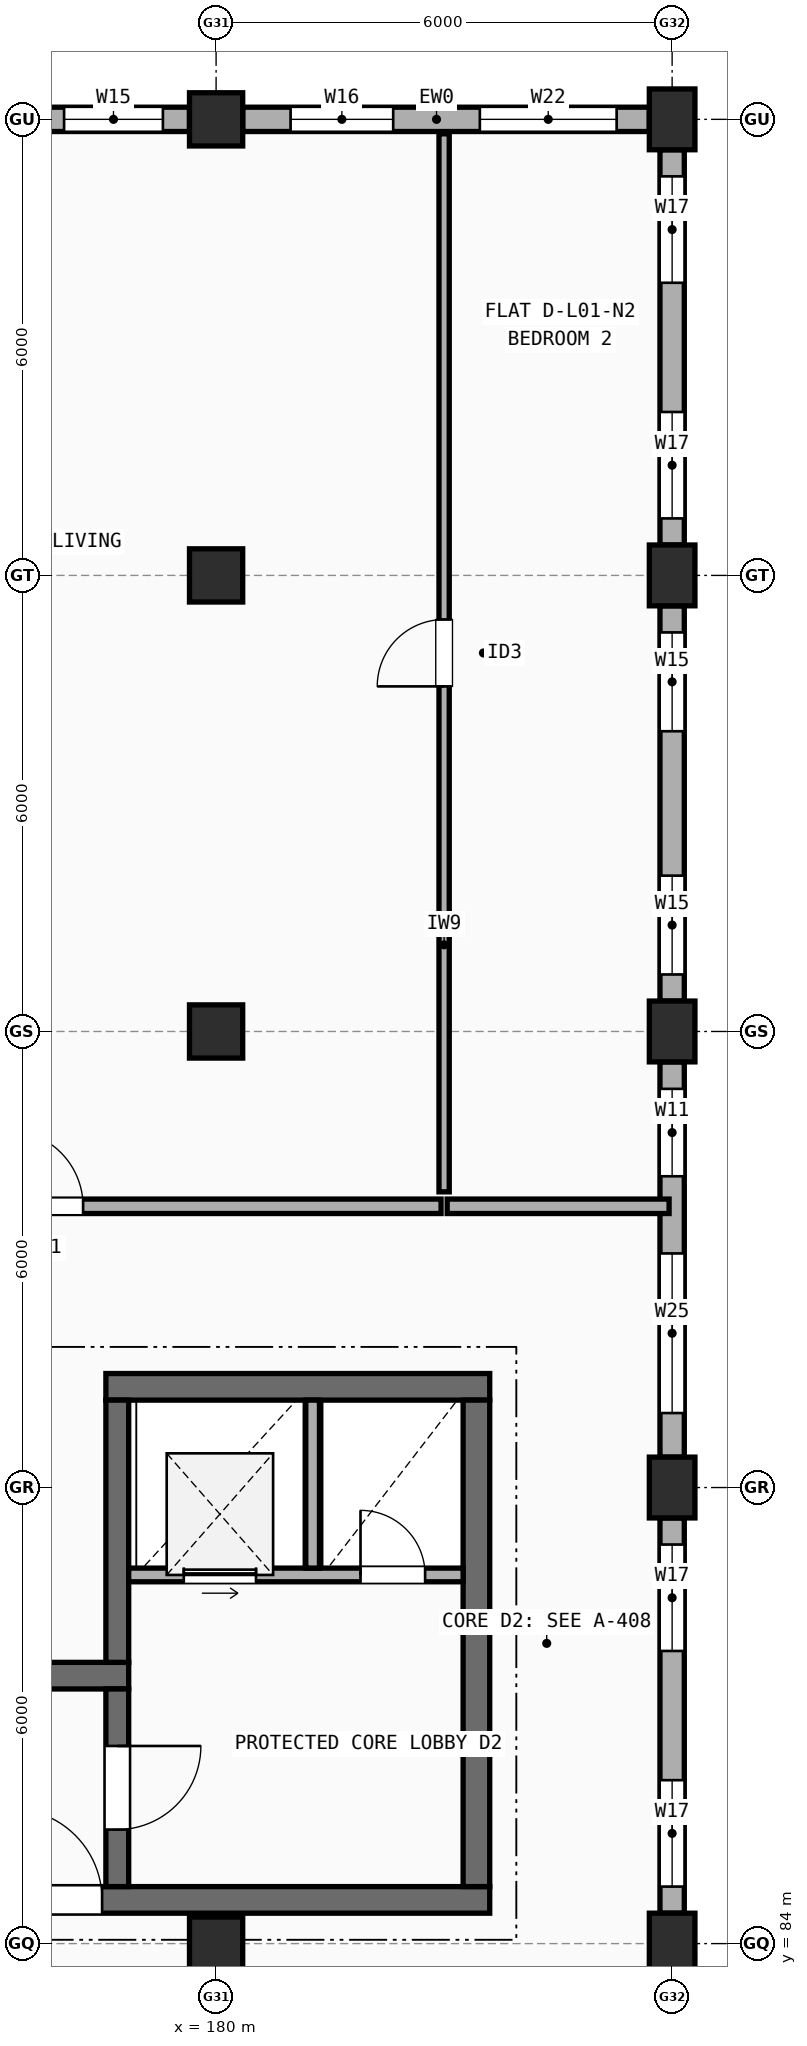
"""IFC4 building model, lengths in metres.
Left out: names, types, materials, properties, quantities, classifications, styles, units other than length and angle.
Written with IfcOpenShell. Run it as: python <this file> out.ifc"""

import sys

from ifc_helpers import new_model, si_unit, direction, frame, frame_2d, origin, origin_2d, place, context, subcontext, project, spatial, rectangle, extrude, element, fill, save


model = new_model("IFC4")
c1 = context("Model", 3, precision=1e-05, world=origin(), true_north=direction((0.0, 1.0)))
c2 = subcontext(c1, "Body", "Model", "MODEL_VIEW")
j1 = project(units=[si_unit("LENGTHUNIT", "METRE"), si_unit("PLANEANGLEUNIT", "RADIAN")], contexts=[c1])
p1 = place(None, origin())
s1 = spatial("IfcSite", under=j1, at=p1, CompositionType="ELEMENT")
p2 = place(p1, origin())
s2 = spatial("IfcBuilding", under=s1, at=p2, CompositionType="ELEMENT")
p3 = place(p2, frame((0.0, 0.0, 4.5)))
s3 = spatial("IfcBuildingStorey", under=s2, at=p3, CompositionType="ELEMENT", Elevation=4.5)
for number, where, z_axis, x_axis in (
    (1, (180.0, 84.0, 0.0), (0.0, 0.0, 1.0), (1.0, 0.0, 0.0)),
    (2, (180.0, 96.0, 0.0), (0.0, 0.0, 1.0), (1.0, 0.0, 0.0)),
    (3, (180.0, 102.0, 0.0), (0.0, 0.0, 1.0), (1.0, 0.0, 0.0)),
    (4, (180.0, 108.0, 0.0), (0.0, 0.0, 1.0), (1.0, 0.0, 0.0)),
):
    element("IfcColumn", number, at=place(p3, frame(where, z_axis=z_axis, x_axis=x_axis)), inside=s3, PredefinedType="COLUMN", context=c2, shape_type="SweptSolid", body=[
        extrude(rectangle(XDim=0.7, YDim=0.7, at=origin_2d()), origin(), (0.0, 0.0, 1.0), 2.945),
    ])
for number, where, z_axis, x_axis in (
    (5, (186.0, 84.0, 0.0), (0.0, 0.0, 1.0), (1.0, 0.0, 0.0)),
    (6, (186.0, 90.0, 0.0), (0.0, 0.0, 1.0), (1.0, 0.0, 0.0)),
    (7, (186.0, 96.0, 0.0), (0.0, 0.0, 1.0), (1.0, 0.0, 0.0)),
    (8, (186.0, 102.0, 0.0), (0.0, 0.0, 1.0), (1.0, 0.0, 0.0)),
    (9, (186.0, 108.0, 0.0), (0.0, 0.0, 1.0), (1.0, 0.0, 0.0)),
):
    element("IfcColumn", number, at=place(p3, frame(where, z_axis=z_axis, x_axis=x_axis)), inside=s3, PredefinedType="COLUMN", context=c2, shape_type="SweptSolid", body=[
        extrude(rectangle(XDim=0.6, YDim=0.8, at=origin_2d()), origin(), (0.0, 0.0, 1.0), 2.945),
    ])
p4 = place(p3, frame((186.0, 84.4, 0.0), z_axis=(0.0, 0.0, 1.0), x_axis=(0.0, 1.0, 0.0)))
e10 = element("IfcWall", 10, at=p4, inside=s3, PredefinedType="STANDARD", context=c2, shape_type="SweptSolid", body=[
    extrude(rectangle(XDim=5.2, YDim=0.32, at=frame_2d((2.6, 0.0))), origin(), (0.0, 0.0, 1.0), 2.945),
])
p5 = place(p4, frame((0.35, 0.0, 0.9)))
e11 = element("IfcOpeningElement", 11, at=p5, cuts=e10, PredefinedType="OPENING", context=c2, shape_type="SweptSolid", body=[
    extrude(rectangle(XDim=1.4, YDim=1.5, at=frame_2d((0.7, 0.75))), frame((0.0, 0.17, 0.0), z_axis=(0.0, -1.0, 0.0), x_axis=(1.0, 0.0, 0.0)), (0.0, 0.0, 1.0), 0.34),
])
p6 = place(p4, frame((3.45, 0.0, 0.9)))
e12 = element("IfcOpeningElement", 12, at=p6, cuts=e10, PredefinedType="OPENING", context=c2, shape_type="SweptSolid", body=[
    extrude(rectangle(XDim=1.4, YDim=1.5, at=frame_2d((0.7, 0.75))), frame((0.0, 0.17, 0.0), z_axis=(0.0, -1.0, 0.0), x_axis=(1.0, 0.0, 0.0)), (0.0, 0.0, 1.0), 0.34),
])
p7 = place(p3, frame((186.0, 90.4, 0.0), z_axis=(0.0, 0.0, 1.0), x_axis=(0.0, 1.0, 0.0)))
e13 = element("IfcWall", 13, at=p7, inside=s3, PredefinedType="STANDARD", context=c2, shape_type="SweptSolid", body=[
    extrude(rectangle(XDim=5.2, YDim=0.32, at=frame_2d((2.6, 0.0))), origin(), (0.0, 0.0, 1.0), 2.945),
])
p8 = place(p7, frame((0.58, 0.0, 0.9)))
e14 = element("IfcOpeningElement", 14, at=p8, cuts=e13, PredefinedType="OPENING", context=c2, shape_type="SweptSolid", body=[
    extrude(rectangle(XDim=2.1, YDim=1.55, at=frame_2d((1.05, 0.775))), frame((0.0, 0.17, 0.0), z_axis=(0.0, -1.0, 0.0), x_axis=(1.0, 0.0, 0.0)), (0.0, 0.0, 1.0), 0.34),
])
p9 = place(p7, frame((3.695, 0.0, 0.9)))
e15 = element("IfcOpeningElement", 15, at=p9, cuts=e13, PredefinedType="OPENING", context=c2, shape_type="SweptSolid", body=[
    extrude(rectangle(XDim=1.15, YDim=1.45, at=frame_2d((0.575, 0.725))), frame((0.0, 0.17, 0.0), z_axis=(0.0, -1.0, 0.0), x_axis=(1.0, 0.0, 0.0)), (0.0, 0.0, 1.0), 0.34),
])
p10 = place(p3, frame((186.0, 96.4, 0.0), z_axis=(0.0, 0.0, 1.0), x_axis=(0.0, 1.0, 0.0)))
e16 = element("IfcWall", 16, at=p10, inside=s3, PredefinedType="STANDARD", context=c2, shape_type="SweptSolid", body=[
    extrude(rectangle(XDim=5.2, YDim=0.32, at=frame_2d((2.6, 0.0))), origin(), (0.0, 0.0, 1.0), 2.945),
])
p11 = place(p10, frame((0.35, 0.0, 0.9)))
e17 = element("IfcOpeningElement", 17, at=p11, cuts=e16, PredefinedType="OPENING", context=c2, shape_type="SweptSolid", body=[
    extrude(rectangle(XDim=1.3, YDim=1.45, at=frame_2d((0.65, 0.725))), frame((0.0, 0.17, 0.0), z_axis=(0.0, -1.0, 0.0), x_axis=(1.0, 0.0, 0.0)), (0.0, 0.0, 1.0), 0.34),
])
p12 = place(p10, frame((3.55, 0.0, 0.9)))
e18 = element("IfcOpeningElement", 18, at=p12, cuts=e16, PredefinedType="OPENING", context=c2, shape_type="SweptSolid", body=[
    extrude(rectangle(XDim=1.3, YDim=1.45, at=frame_2d((0.65, 0.725))), frame((0.0, 0.17, 0.0), z_axis=(0.0, -1.0, 0.0), x_axis=(1.0, 0.0, 0.0)), (0.0, 0.0, 1.0), 0.34),
])
p13 = place(p3, frame((186.0, 102.4, 0.0), z_axis=(0.0, 0.0, 1.0), x_axis=(0.0, 1.0, 0.0)))
e19 = element("IfcWall", 19, at=p13, inside=s3, PredefinedType="STANDARD", context=c2, shape_type="SweptSolid", body=[
    extrude(rectangle(XDim=5.2, YDim=0.32, at=frame_2d((2.6, 0.0))), origin(), (0.0, 0.0, 1.0), 2.945),
])
p14 = place(p13, frame((0.35, 0.0, 0.9)))
e20 = element("IfcOpeningElement", 20, at=p14, cuts=e19, PredefinedType="OPENING", context=c2, shape_type="SweptSolid", body=[
    extrude(rectangle(XDim=1.4, YDim=1.5, at=frame_2d((0.7, 0.75))), frame((0.0, 0.17, 0.0), z_axis=(0.0, -1.0, 0.0), x_axis=(1.0, 0.0, 0.0)), (0.0, 0.0, 1.0), 0.34),
])
p15 = place(p13, frame((3.45, 0.0, 0.9)))
e21 = element("IfcOpeningElement", 21, at=p15, cuts=e19, PredefinedType="OPENING", context=c2, shape_type="SweptSolid", body=[
    extrude(rectangle(XDim=1.4, YDim=1.5, at=frame_2d((0.7, 0.75))), frame((0.0, 0.17, 0.0), z_axis=(0.0, -1.0, 0.0), x_axis=(1.0, 0.0, 0.0)), (0.0, 0.0, 1.0), 0.34),
])
p16 = place(p3, frame((185.7, 108.0, 0.0), z_axis=(0.0, 0.0, 1.0), x_axis=(-1.0, 0.0, 0.0)))
e22 = element("IfcWall", 22, at=p16, inside=s3, PredefinedType="STANDARD", context=c2, shape_type="SweptSolid", body=[
    extrude(rectangle(XDim=5.35, YDim=0.32, at=frame_2d((2.675, 0.0))), origin(), (0.0, 0.0, 1.0), 2.608),
])
p17 = place(p16, frame((0.43, 0.0, 0.9)))
e23 = element("IfcOpeningElement", 23, at=p17, cuts=e22, PredefinedType="OPENING", context=c2, shape_type="SweptSolid", body=[
    extrude(rectangle(XDim=1.8, YDim=1.45, at=frame_2d((0.9, 0.725))), frame((0.0, 0.17, 0.0), z_axis=(0.0, -1.0, 0.0), x_axis=(1.0, 0.0, 0.0)), (0.0, 0.0, 1.0), 0.34),
])
p18 = place(p16, frame((3.37, 0.0, 0.9)))
e24 = element("IfcOpeningElement", 24, at=p18, cuts=e22, PredefinedType="OPENING", context=c2, shape_type="SweptSolid", body=[
    extrude(rectangle(XDim=1.35, YDim=1.5, at=frame_2d((0.675, 0.75))), frame((0.0, 0.17, 0.0), z_axis=(0.0, -1.0, 0.0), x_axis=(1.0, 0.0, 0.0)), (0.0, 0.0, 1.0), 0.34),
])
p19 = place(p3, frame((179.65, 108.0, 0.0), z_axis=(0.0, 0.0, 1.0), x_axis=(-1.0, 0.0, 0.0)))
e25 = element("IfcWall", 25, at=p19, inside=s3, PredefinedType="STANDARD", context=c2, shape_type="SweptSolid", body=[
    extrude(rectangle(XDim=5.3, YDim=0.32, at=frame_2d((2.65, 0.0))), origin(), (0.0, 0.0, 1.0), 2.638),
])
p20 = place(p19, frame((0.35, 0.0, 0.9)))
e26 = element("IfcOpeningElement", 26, at=p20, cuts=e25, PredefinedType="OPENING", context=c2, shape_type="SweptSolid", body=[
    extrude(rectangle(XDim=1.3, YDim=1.45, at=frame_2d((0.65, 0.725))), frame((0.0, 0.17, 0.0), z_axis=(0.0, -1.0, 0.0), x_axis=(1.0, 0.0, 0.0)), (0.0, 0.0, 1.0), 0.34),
])
p21 = place(p19, frame((3.65, 0.0, 0.9)))
e27 = element("IfcOpeningElement", 27, at=p21, cuts=e25, PredefinedType="OPENING", context=c2, shape_type="SweptSolid", body=[
    extrude(rectangle(XDim=1.3, YDim=1.45, at=frame_2d((0.65, 0.725))), frame((0.0, 0.17, 0.0), z_axis=(0.0, -1.0, 0.0), x_axis=(1.0, 0.0, 0.0)), (0.0, 0.0, 1.0), 0.34),
])
p22 = place(p3, frame((172.2, 84.575, 0.0), z_axis=(0.0, 0.0, 1.0), x_axis=(1.0, 0.0, 0.0)))
e28 = element("IfcWall", 28, at=p22, inside=s3, PredefinedType="SHEAR", context=c2, shape_type="SweptSolid", body=[
    extrude(rectangle(XDim=11.4, YDim=0.35, at=frame_2d((5.7, 0.0))), origin(), (0.0, 0.0, 1.0), 2.945),
])
p23 = place(p22, frame((5.1, 0.0, 0.0)))
e29 = element("IfcOpeningElement", 29, at=p23, cuts=e28, PredefinedType="OPENING", context=c2, shape_type="SweptSolid", body=[
    extrude(rectangle(XDim=1.2, YDim=2.15, at=frame_2d((0.6, 1.075))), frame((0.0, 0.185, 0.0), z_axis=(0.0, -1.0, 0.0), x_axis=(1.0, 0.0, 0.0)), (0.0, 0.0, 1.0), 0.37),
])
p24 = place(p3, frame((178.85, 87.525, 0.0), z_axis=(0.0, 0.0, 1.0), x_axis=(-1.0, 0.0, 0.0)))
e30 = element("IfcWall", 30, at=p24, inside=s3, PredefinedType="SHEAR", context=c2, shape_type="SweptSolid", body=[
    extrude(rectangle(XDim=6.65, YDim=0.35, at=frame_2d((3.325, 0.0))), origin(), (0.0, 0.0, 1.0), 2.945),
])
p25 = place(p3, frame((178.7, 84.75, 0.0), z_axis=(0.0, 0.0, 1.0), x_axis=(0.0, 1.0, 0.0)))
e31 = element("IfcWall", 31, at=p25, inside=s3, PredefinedType="SHEAR", context=c2, shape_type="SweptSolid", body=[
    extrude(rectangle(XDim=2.6, YDim=0.3, at=frame_2d((1.3, 0.0))), origin(), (0.0, 0.0, 1.0), 2.945),
])
p26 = place(p25, frame((0.75, 0.0, 0.0)))
e32 = element("IfcOpeningElement", 32, at=p26, cuts=e31, PredefinedType="OPENING", context=c2, shape_type="SweptSolid", body=[
    extrude(rectangle(XDim=1.1, YDim=2.15, at=frame_2d((0.55, 1.075))), frame((0.0, 0.16, 0.0), z_axis=(0.0, -1.0, 0.0), x_axis=(1.0, 0.0, 0.0)), (0.0, 0.0, 1.0), 0.32),
])
p27 = place(p3, frame((183.6, 91.325, 0.0), z_axis=(0.0, 0.0, 1.0), x_axis=(-1.0, 0.0, 0.0)))
e33 = element("IfcWall", 33, at=p27, inside=s3, PredefinedType="SHEAR", context=c2, shape_type="SweptSolid", body=[
    extrude(rectangle(XDim=5.05, YDim=0.35, at=frame_2d((2.525, 0.0))), origin(), (0.0, 0.0, 1.0), 2.945),
])
p28 = place(p3, frame((183.425, 84.75, 0.0), z_axis=(0.0, 0.0, 1.0), x_axis=(0.0, 1.0, 0.0)))
e34 = element("IfcWall", 34, at=p28, inside=s3, PredefinedType="SHEAR", context=c2, shape_type="SweptSolid", body=[
    extrude(rectangle(XDim=6.4, YDim=0.35, at=frame_2d((3.2, 0.0))), origin(), (0.0, 0.0, 1.0), 2.945),
])
p29 = place(p3, frame((178.7, 87.7, 0.0), z_axis=(0.0, 0.0, 1.0), x_axis=(0.0, 1.0, 0.0)))
e35 = element("IfcWall", 35, at=p29, inside=s3, PredefinedType="SHEAR", context=c2, shape_type="SweptSolid", body=[
    extrude(rectangle(XDim=3.45, YDim=0.3, at=frame_2d((1.725, 0.0))), origin(), (0.0, 0.0, 1.0), 2.945),
])
p30 = place(p3, frame((178.85, 88.85, 0.0), z_axis=(0.0, 0.0, 1.0), x_axis=(1.0, 0.0, 0.0)))
e36 = element("IfcWall", 36, at=p30, inside=s3, PredefinedType="SOLIDWALL", context=c2, shape_type="SweptSolid", body=[
    extrude(rectangle(XDim=4.4, YDim=0.18, at=frame_2d((2.2, 0.0))), origin(), (0.0, 0.0, 1.0), 2.945),
])
p31 = place(p30, frame((0.725, 0.0, 0.0)))
e37 = element("IfcOpeningElement", 37, at=p31, cuts=e36, PredefinedType="OPENING", context=c2, shape_type="SweptSolid", body=[
    extrude(rectangle(XDim=0.95, YDim=2.15, at=frame_2d((0.475, 1.075))), frame((0.0, 0.1, 0.0), z_axis=(0.0, -1.0, 0.0), x_axis=(1.0, 0.0, 0.0)), (0.0, 0.0, 1.0), 0.2),
])
p32 = place(p30, frame((3.05, 0.0, 0.0)))
e38 = element("IfcOpeningElement", 38, at=p32, cuts=e36, PredefinedType="OPENING", context=c2, shape_type="SweptSolid", body=[
    extrude(rectangle(XDim=0.85, YDim=2.1, at=frame_2d((0.425, 1.05))), frame((0.0, 0.1, 0.0), z_axis=(0.0, -1.0, 0.0), x_axis=(1.0, 0.0, 0.0)), (0.0, 0.0, 1.0), 0.2),
])
p33 = place(p3, frame((181.27, 88.94, 0.0), z_axis=(0.0, 0.0, 1.0), x_axis=(0.0, 1.0, 0.0)))
e39 = element("IfcWall", 39, at=p33, inside=s3, PredefinedType="SOLIDWALL", context=c2, shape_type="SweptSolid", body=[
    extrude(rectangle(XDim=2.21, YDim=0.18, at=frame_2d((1.105, 0.0))), origin(), (0.0, 0.0, 1.0), 2.945),
])
p34 = place(p3, frame((172.54, 93.7, 0.0), z_axis=(0.0, 0.0, 1.0), x_axis=(1.0, 0.0, 0.0)))
e40 = element("IfcWall", 40, at=p34, inside=s3, PredefinedType="SOLIDWALL", context=c2, shape_type="SweptSolid", body=[
    extrude(rectangle(XDim=10.42, YDim=0.19, at=frame_2d((5.21, 0.0))), origin(), (0.0, 0.0, 1.0), 2.945),
])
p35 = place(p34, frame((4.71, 0.0, 0.0)))
e41 = element("IfcOpeningElement", 41, at=p35, cuts=e40, PredefinedType="OPENING", context=c2, shape_type="SweptSolid", body=[
    extrude(rectangle(XDim=1.0, YDim=2.15, at=frame_2d((0.5, 1.075))), frame((0.0, 0.105, 0.0), z_axis=(0.0, -1.0, 0.0), x_axis=(1.0, 0.0, 0.0)), (0.0, 0.0, 1.0), 0.21),
])
p36 = place(p3, frame((183.04, 93.7, 0.0), z_axis=(0.0, 0.0, 1.0), x_axis=(1.0, 0.0, 0.0)))
e42 = element("IfcWall", 42, at=p36, inside=s3, PredefinedType="SOLIDWALL", context=c2, shape_type="SweptSolid", body=[
    extrude(rectangle(XDim=2.92, YDim=0.19, at=frame_2d((1.46, 0.0))), origin(), (0.0, 0.0, 1.0), 2.945),
])
p37 = place(p3, frame((183.0, 93.89, 0.0), z_axis=(0.0, 0.0, 1.0), x_axis=(0.0, 1.0, 0.0)))
e43 = element("IfcWall", 43, at=p37, inside=s3, PredefinedType="PARTITIONING", context=c2, shape_type="SweptSolid", body=[
    extrude(rectangle(XDim=13.92, YDim=0.135, at=frame_2d((6.96, 0.0))), origin(), (0.0, 0.0, 1.0), 2.548),
])
p38 = place(p37, frame((6.65, 0.0, 0.0)))
e44 = element("IfcOpeningElement", 44, at=p38, cuts=e43, PredefinedType="OPENING", context=c2, shape_type="SweptSolid", body=[
    extrude(rectangle(XDim=0.88, YDim=2.1, at=frame_2d((0.44, 1.05))), frame((0.0, 0.077, 0.0), z_axis=(0.0, -1.0, 0.0), x_axis=(1.0, 0.0, 0.0)), (0.0, 0.0, 1.0), 0.155),
])
p39 = place(p5, origin())
e45 = element("IfcWindow", 45, at=p39, inside=s3, PartitioningType="SINGLE_PANEL", PredefinedType="WINDOW", context=c2, shape_type="SweptSolid", body=[
    extrude(rectangle(XDim=1.4, YDim=1.5, at=frame_2d((0.7, 0.75))), frame((0.0, 0.03, 0.0), z_axis=(0.0, -1.0, 0.0), x_axis=(1.0, 0.0, 0.0)), (0.0, 0.0, 1.0), 0.06),
])
fill(e11, e45)
p40 = place(p6, origin())
e46 = element("IfcWindow", 46, at=p40, inside=s3, PartitioningType="SINGLE_PANEL", PredefinedType="WINDOW", context=c2, shape_type="SweptSolid", body=[
    extrude(rectangle(XDim=1.4, YDim=1.5, at=frame_2d((0.7, 0.75))), frame((0.0, 0.03, 0.0), z_axis=(0.0, -1.0, 0.0), x_axis=(1.0, 0.0, 0.0)), (0.0, 0.0, 1.0), 0.06),
])
fill(e12, e46)
p41 = place(p8, origin())
e47 = element("IfcWindow", 47, at=p41, inside=s3, PartitioningType="SINGLE_PANEL", PredefinedType="WINDOW", context=c2, shape_type="SweptSolid", body=[
    extrude(rectangle(XDim=2.1, YDim=1.55, at=frame_2d((1.05, 0.775))), frame((0.0, 0.03, 0.0), z_axis=(0.0, -1.0, 0.0), x_axis=(1.0, 0.0, 0.0)), (0.0, 0.0, 1.0), 0.06),
])
fill(e14, e47)
p42 = place(p9, origin())
e48 = element("IfcWindow", 48, at=p42, inside=s3, PartitioningType="SINGLE_PANEL", PredefinedType="WINDOW", context=c2, shape_type="SweptSolid", body=[
    extrude(rectangle(XDim=1.15, YDim=1.45, at=frame_2d((0.575, 0.725))), frame((0.0, 0.03, 0.0), z_axis=(0.0, -1.0, 0.0), x_axis=(1.0, 0.0, 0.0)), (0.0, 0.0, 1.0), 0.06),
])
fill(e15, e48)
p43 = place(p11, origin())
e49 = element("IfcWindow", 49, at=p43, inside=s3, PartitioningType="SINGLE_PANEL", PredefinedType="WINDOW", context=c2, shape_type="SweptSolid", body=[
    extrude(rectangle(XDim=1.3, YDim=1.45, at=frame_2d((0.65, 0.725))), frame((0.0, 0.03, 0.0), z_axis=(0.0, -1.0, 0.0), x_axis=(1.0, 0.0, 0.0)), (0.0, 0.0, 1.0), 0.06),
])
fill(e17, e49)
p44 = place(p12, origin())
e50 = element("IfcWindow", 50, at=p44, inside=s3, PartitioningType="SINGLE_PANEL", PredefinedType="WINDOW", context=c2, shape_type="SweptSolid", body=[
    extrude(rectangle(XDim=1.3, YDim=1.45, at=frame_2d((0.65, 0.725))), frame((0.0, 0.03, 0.0), z_axis=(0.0, -1.0, 0.0), x_axis=(1.0, 0.0, 0.0)), (0.0, 0.0, 1.0), 0.06),
])
fill(e18, e50)
p45 = place(p14, origin())
e51 = element("IfcWindow", 51, at=p45, inside=s3, PartitioningType="SINGLE_PANEL", PredefinedType="WINDOW", context=c2, shape_type="SweptSolid", body=[
    extrude(rectangle(XDim=1.4, YDim=1.5, at=frame_2d((0.7, 0.75))), frame((0.0, 0.03, 0.0), z_axis=(0.0, -1.0, 0.0), x_axis=(1.0, 0.0, 0.0)), (0.0, 0.0, 1.0), 0.06),
])
fill(e20, e51)
p46 = place(p15, origin())
e52 = element("IfcWindow", 52, at=p46, inside=s3, PartitioningType="SINGLE_PANEL", PredefinedType="WINDOW", context=c2, shape_type="SweptSolid", body=[
    extrude(rectangle(XDim=1.4, YDim=1.5, at=frame_2d((0.7, 0.75))), frame((0.0, 0.03, 0.0), z_axis=(0.0, -1.0, 0.0), x_axis=(1.0, 0.0, 0.0)), (0.0, 0.0, 1.0), 0.06),
])
fill(e21, e52)
p47 = place(p17, origin())
e53 = element("IfcWindow", 53, at=p47, inside=s3, PartitioningType="SINGLE_PANEL", PredefinedType="WINDOW", context=c2, shape_type="SweptSolid", body=[
    extrude(rectangle(XDim=1.8, YDim=1.45, at=frame_2d((0.9, 0.725))), frame((0.0, 0.03, 0.0), z_axis=(0.0, -1.0, 0.0), x_axis=(1.0, 0.0, 0.0)), (0.0, 0.0, 1.0), 0.06),
])
fill(e23, e53)
p48 = place(p18, origin())
e54 = element("IfcWindow", 54, at=p48, inside=s3, PartitioningType="SINGLE_PANEL", PredefinedType="WINDOW", context=c2, shape_type="SweptSolid", body=[
    extrude(rectangle(XDim=1.35, YDim=1.5, at=frame_2d((0.675, 0.75))), frame((0.0, 0.03, 0.0), z_axis=(0.0, -1.0, 0.0), x_axis=(1.0, 0.0, 0.0)), (0.0, 0.0, 1.0), 0.06),
])
fill(e24, e54)
p49 = place(p20, origin())
e55 = element("IfcWindow", 55, at=p49, inside=s3, PartitioningType="SINGLE_PANEL", PredefinedType="WINDOW", context=c2, shape_type="SweptSolid", body=[
    extrude(rectangle(XDim=1.3, YDim=1.45, at=frame_2d((0.65, 0.725))), frame((0.0, 0.03, 0.0), z_axis=(0.0, -1.0, 0.0), x_axis=(1.0, 0.0, 0.0)), (0.0, 0.0, 1.0), 0.06),
])
fill(e26, e55)
p50 = place(p23, origin())
e56 = element("IfcDoor", 56, at=p50, inside=s3, OperationType="SINGLE_SWING_LEFT", PredefinedType="DOOR", context=c2, shape_type="SweptSolid", body=[
    extrude(rectangle(XDim=1.2, YDim=2.15, at=frame_2d((0.6, 1.075))), frame((0.0, 0.025, 0.0), z_axis=(0.0, -1.0, 0.0), x_axis=(1.0, 0.0, 0.0)), (0.0, 0.0, 1.0), 0.05),
])
fill(e29, e56)
p51 = place(p26, origin())
e57 = element("IfcDoor", 57, at=p51, inside=s3, OperationType="SINGLE_SWING_RIGHT", PredefinedType="DOOR", context=c2, shape_type="SweptSolid", body=[
    extrude(rectangle(XDim=1.1, YDim=2.15, at=frame_2d((0.55, 1.075))), frame((0.0, 0.025, 0.0), z_axis=(0.0, -1.0, 0.0), x_axis=(1.0, 0.0, 0.0)), (0.0, 0.0, 1.0), 0.05),
])
fill(e32, e57)
p52 = place(p31, origin())
e58 = element("IfcDoor", 58, at=p52, inside=s3, OperationType="SLIDING_TO_LEFT", PredefinedType="DOOR", context=c2, shape_type="SweptSolid", body=[
    extrude(rectangle(XDim=0.95, YDim=2.15, at=frame_2d((0.475, 1.075))), frame((0.0, 0.025, 0.0), z_axis=(0.0, -1.0, 0.0), x_axis=(1.0, 0.0, 0.0)), (0.0, 0.0, 1.0), 0.05),
])
fill(e37, e58)
p53 = place(p32, frame((0.85, 0.0, 0.0), z_axis=(0.0, 0.0, 1.0), x_axis=(-1.0, 0.0, 0.0)))
e59 = element("IfcDoor", 59, at=p53, inside=s3, OperationType="SINGLE_SWING_LEFT", PredefinedType="DOOR", context=c2, shape_type="SweptSolid", body=[
    extrude(rectangle(XDim=0.85, YDim=2.1, at=frame_2d((0.425, 1.05))), frame((0.0, 0.025, 0.0), z_axis=(0.0, -1.0, 0.0), x_axis=(1.0, 0.0, 0.0)), (0.0, 0.0, 1.0), 0.05),
])
fill(e38, e59)
p54 = place(p35, origin())
e60 = element("IfcDoor", 60, at=p54, inside=s3, OperationType="SINGLE_SWING_LEFT", PredefinedType="DOOR", context=c2, shape_type="SweptSolid", body=[
    extrude(rectangle(XDim=1.0, YDim=2.15, at=frame_2d((0.5, 1.075))), frame((0.0, 0.025, 0.0), z_axis=(0.0, -1.0, 0.0), x_axis=(1.0, 0.0, 0.0)), (0.0, 0.0, 1.0), 0.05),
])
fill(e41, e60)
p55 = place(p38, origin())
e61 = element("IfcDoor", 61, at=p55, inside=s3, OperationType="SINGLE_SWING_LEFT", PredefinedType="DOOR", context=c2, shape_type="SweptSolid", body=[
    extrude(rectangle(XDim=0.88, YDim=2.1, at=frame_2d((0.44, 1.05))), frame((0.0, 0.025, 0.0), z_axis=(0.0, -1.0, 0.0), x_axis=(1.0, 0.0, 0.0)), (0.0, 0.0, 1.0), 0.05),
])
fill(e44, e61)
save(model, sys.argv[1])
